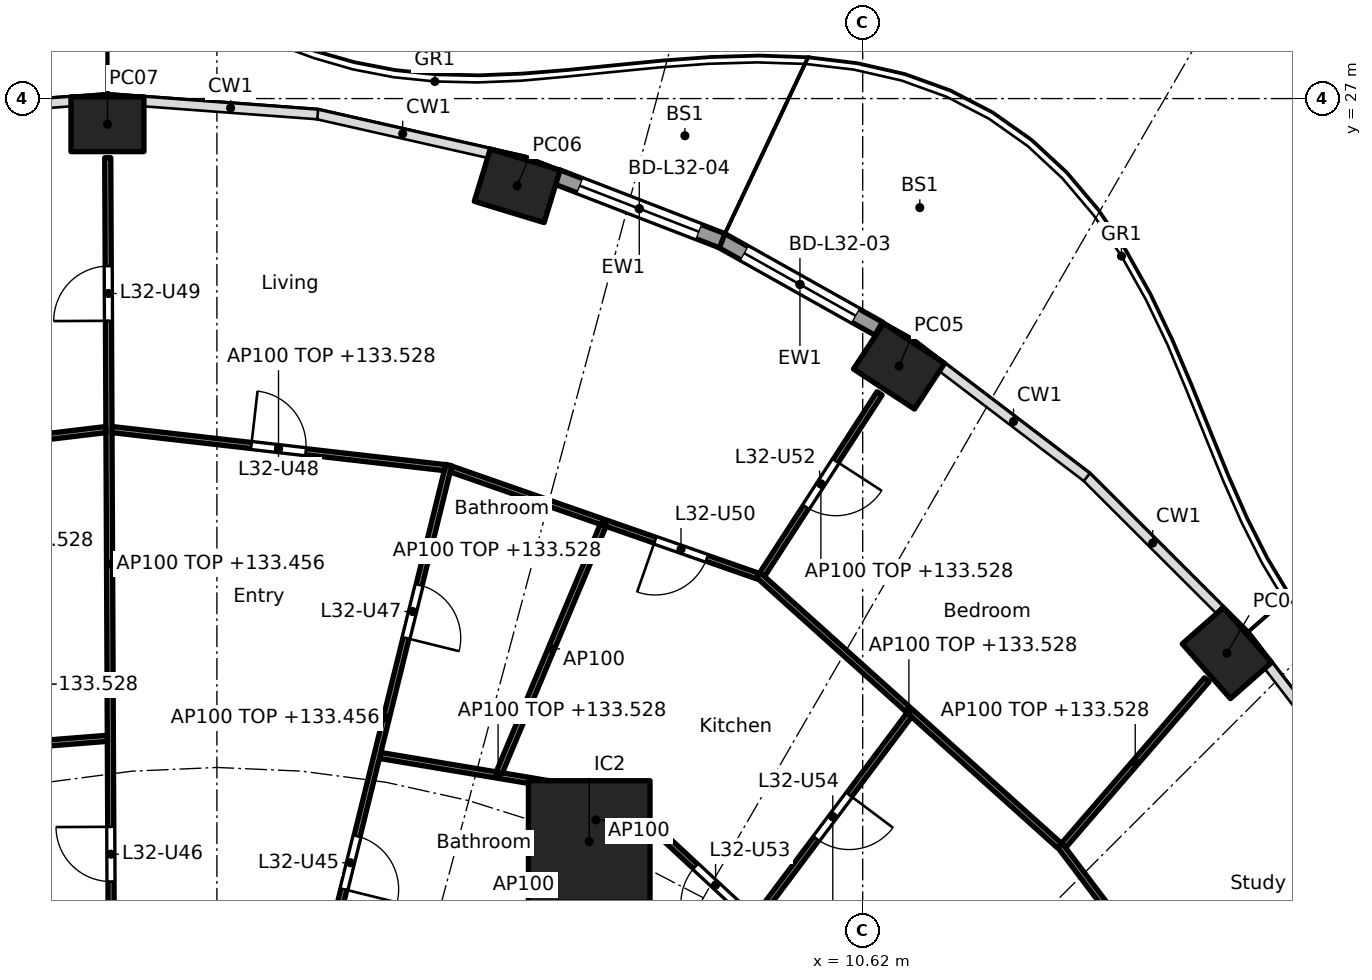
"""IFC4 building model, lengths in metres.
Left out: names, types, materials, properties, quantities, classifications, styles, units other than length and angle.
Written with IfcOpenShell. Run it as: python <this file> out.ifc"""

import sys

from ifc_helpers import new_model, si_unit, direction, frame, frame_2d, origin, origin_2d, place, context, subcontext, project, spatial, rectangle, hollow_rectangle, extrude, element, fill, save


model = new_model("IFC4")
c1 = context("Model", 3, precision=1e-05, world=origin(), true_north=direction((0.0, 1.0)))
c2 = subcontext(c1, "Body", "Model", "MODEL_VIEW")
j1 = project(units=[si_unit("LENGTHUNIT", "METRE"), si_unit("PLANEANGLEUNIT", "RADIAN")], contexts=[c1])
p1 = place(None, origin())
s1 = spatial("IfcSite", under=j1, at=p1, CompositionType="ELEMENT")
p2 = place(p1, origin())
s2 = spatial("IfcBuilding", under=s1, at=p2, CompositionType="ELEMENT")
p3 = place(p2, frame((0.0, 0.0, 130.7)))
s3 = spatial("IfcBuildingStorey", under=s2, at=p3, CompositionType="ELEMENT", Elevation=130.7)
for number, where, z_axis, x_axis in (
    (1, (16.61, 17.88, 0.0), (0.0, 0.0, 1.0), (-0.66, 0.751, 0.0)),
    (2, (11.218, 22.599, 0.0), (0.0, 0.0, 1.0), (-0.836, 0.549, 0.0)),
    (3, (4.938, 25.565, 0.0), (0.0, 0.0, 1.0), (-0.957, 0.292, 0.0)),
    (4, (-1.8, 26.577, 0.0), (0.0, 0.0, 1.0), (-1.0, 0.0, 0.0)),
):
    element("IfcColumn", number, at=place(p3, frame(where, z_axis=z_axis, x_axis=x_axis)), inside=s3, PredefinedType="COLUMN", context=c2, shape_type="SweptSolid", body=[
        extrude(hollow_rectangle(XDim=1.2, YDim=0.9, WallThickness=0.04, at=origin_2d()), origin(), (0.0, 0.0, 1.0), 3.7),
    ])
p4 = place(p3, frame((6.123, 14.782, 0.0), z_axis=(0.0, 0.0, 1.0), x_axis=(1.0, 0.0, 0.0)))
e5 = element("IfcColumn", 5, at=p4, inside=s3, PredefinedType="COLUMN", context=c2, shape_type="SweptSolid", body=[
    extrude(rectangle(XDim=2.0, YDim=2.0, at=origin_2d()), origin(), (0.0, 0.0, 1.0), 3.7),
])
p5 = place(p3, frame((8.293, 24.67, 0.0), z_axis=(0.0, 0.0, 1.0), x_axis=(0.87206688547, -0.489386705241, 0.0)))
e6 = element("IfcWall", 6, at=p5, inside=s3, PredefinedType="SOLIDWALL", context=c2, shape_type="SweptSolid", body=[
    extrude(rectangle(XDim=2.97, YDim=0.25, at=frame_2d((1.485, 0.0))), origin(), (0.0, 0.0, 1.0), 3.44),
])
p6 = place(p5, frame((0.435, 0.0, 0.0)))
e7 = element("IfcOpeningElement", 7, at=p6, cuts=e6, PredefinedType="OPENING", context=c2, shape_type="SweptSolid", body=[
    extrude(rectangle(XDim=2.1, YDim=2.4, at=frame_2d((1.05, 1.2))), frame((0.0, 0.135, 0.0), z_axis=(0.0, -1.0, 0.0), x_axis=(1.0, 0.0, 0.0)), (0.0, 0.0, 1.0), 0.27),
])
p7 = place(p3, frame((5.583, 25.716, 0.0), z_axis=(0.0, 0.0, 1.0), x_axis=(0.932845344347, -0.360277064952, 0.0)))
e8 = element("IfcWall", 8, at=p7, inside=s3, PredefinedType="SOLIDWALL", context=c2, shape_type="SweptSolid", body=[
    extrude(rectangle(XDim=2.923, YDim=0.25, at=frame_2d((1.462, 0.0))), origin(), (0.0, 0.0, 1.0), 3.44),
])
p8 = place(p7, frame((0.412, 0.0, 0.0)))
e9 = element("IfcOpeningElement", 9, at=p8, cuts=e8, PredefinedType="OPENING", context=c2, shape_type="SweptSolid", body=[
    extrude(rectangle(XDim=2.1, YDim=2.4, at=frame_2d((1.05, 1.2))), frame((0.0, 0.135, 0.0), z_axis=(0.0, -1.0, 0.0), x_axis=(1.0, 0.0, 0.0)), (0.0, 0.0, 1.0), 0.27),
])
p9 = place(p3, frame((18.016, 9.218, 0.0), z_axis=(0.0, 0.0, 1.0), x_axis=(-0.602411163107, 0.798185937338, 0.0)))
e10 = element("IfcWall", 10, at=p9, inside=s3, PredefinedType="PARTITIONING", context=c2, shape_type="SweptSolid", body=[
    extrude(rectangle(XDim=6.894, YDim=0.1, at=frame_2d((3.447, 0.0))), origin(), (0.0, 0.0, 1.0), 2.828),
])
p10 = place(p9, frame((2.972, 0.0, 0.0)))
e11 = element("IfcOpeningElement", 11, at=p10, cuts=e10, PredefinedType="OPENING", context=c2, shape_type="SweptSolid", body=[
    extrude(rectangle(XDim=0.9, YDim=2.1, at=frame_2d((0.45, 1.05))), frame((0.0, 0.06, 0.0), z_axis=(0.0, -1.0, 0.0), x_axis=(1.0, 0.0, 0.0)), (0.0, 0.0, 1.0), 0.12),
])
p11 = place(p3, frame((11.029, 11.443, 0.0), z_axis=(0.0, 0.0, 1.0), x_axis=(-0.733121281629, 0.680097924143, 0.0)))
e12 = element("IfcWall", 12, at=p11, inside=s3, PredefinedType="PARTITIONING", context=c2, shape_type="SweptSolid", body=[
    extrude(rectangle(XDim=6.073, YDim=0.1, at=frame_2d((3.037, 0.0))), origin(), (0.0, 0.0, 1.0), 2.828),
])
p12 = place(p11, frame((3.408, 0.0, 0.0)))
e13 = element("IfcOpeningElement", 13, at=p12, cuts=e12, PredefinedType="OPENING", context=c2, shape_type="SweptSolid", body=[
    extrude(rectangle(XDim=0.9, YDim=2.1, at=frame_2d((0.45, 1.05))), frame((0.0, 0.06, 0.0), z_axis=(0.0, -1.0, 0.0), x_axis=(1.0, 0.0, 0.0)), (0.0, 0.0, 1.0), 0.12),
])
p13 = place(p3, frame((13.926, 14.719, 0.0), z_axis=(0.0, 0.0, 1.0), x_axis=(0.653831857253, 0.756639876323, 0.0)))
e14 = element("IfcWall", 14, at=p13, inside=s3, PredefinedType="PARTITIONING", context=c2, shape_type="SweptSolid", body=[
    extrude(rectangle(XDim=3.598, YDim=0.1, at=frame_2d((1.799, 0.0))), origin(), (0.0, 0.0, 1.0), 2.828),
])
p14 = place(p3, frame((13.856, 14.714, 0.0), z_axis=(0.0, 0.0, 1.0), x_axis=(-0.743793479211, 0.668409500444, 0.0)))
e15 = element("IfcWall", 15, at=p14, inside=s3, PredefinedType="PARTITIONING", context=c2, shape_type="SweptSolid", body=[
    extrude(rectangle(XDim=6.659, YDim=0.1, at=frame_2d((3.329, 0.0))), origin(), (0.0, 0.0, 1.0), 2.828),
])
p15 = place(p3, frame((8.87, 13.514, 0.0), z_axis=(0.0, 0.0, 1.0), x_axis=(0.600475102839, 0.79964345234, 0.0)))
e16 = element("IfcWall", 16, at=p15, inside=s3, PredefinedType="PARTITIONING", context=c2, shape_type="SweptSolid", body=[
    extrude(rectangle(XDim=4.192, YDim=0.1, at=frame_2d((2.096, 0.0))), origin(), (0.0, 0.0, 1.0), 3.44),
])
p16 = place(p15, frame((1.646, 0.0, 0.0)))
e17 = element("IfcOpeningElement", 17, at=p16, cuts=e16, PredefinedType="OPENING", context=c2, shape_type="SweptSolid", body=[
    extrude(rectangle(XDim=0.9, YDim=2.1, at=frame_2d((0.45, 1.05))), frame((0.0, 0.06, 0.0), z_axis=(0.0, -1.0, 0.0), x_axis=(1.0, 0.0, 0.0)), (0.0, 0.0, 1.0), 0.12),
])
p17 = place(p3, frame((5.243, 12.657, 0.0), z_axis=(0.0, 0.0, 1.0), x_axis=(0.382719158442, 0.923864733477, 0.0)))
e18 = element("IfcWall", 18, at=p17, inside=s3, PredefinedType="PARTITIONING", context=c2, shape_type="SweptSolid", body=[
    extrude(rectangle(XDim=2.25, YDim=0.1, at=frame_2d((1.125, 0.0))), origin(), (0.0, 0.0, 1.0), 3.44),
])
p18 = place(p3, frame((6.564, 15.547, 0.0), z_axis=(0.0, 0.0, 1.0), x_axis=(-0.986269521186, 0.165143669511, 0.0)))
e19 = element("IfcWall", 19, at=p18, inside=s3, PredefinedType="PARTITIONING", context=c2, shape_type="SweptSolid", body=[
    extrude(rectangle(XDim=3.934, YDim=0.1, at=frame_2d((1.967, 0.0))), origin(), (0.0, 0.0, 1.0), 2.828),
])
p19 = place(p3, frame((8.968, 19.174, 0.0), z_axis=(0.0, 0.0, 1.0), x_axis=(0.543713319379, 0.83927100887, 0.0)))
e20 = element("IfcWall", 20, at=p19, inside=s3, PredefinedType="PARTITIONING", context=c2, shape_type="SweptSolid", body=[
    extrude(rectangle(XDim=3.549, YDim=0.1, at=frame_2d((1.774, 0.0))), origin(), (0.0, 0.0, 1.0), 2.828),
])
p20 = place(p19, frame((1.324, 0.0, 0.0)))
e21 = element("IfcOpeningElement", 21, at=p20, cuts=e20, PredefinedType="OPENING", context=c2, shape_type="SweptSolid", body=[
    extrude(rectangle(XDim=0.9, YDim=2.1, at=frame_2d((0.45, 1.05))), frame((0.0, 0.06, 0.0), z_axis=(0.0, -1.0, 0.0), x_axis=(1.0, 0.0, 0.0)), (0.0, 0.0, 1.0), 0.12),
])
p21 = place(p3, frame((8.894, 19.148, 0.0), z_axis=(0.0, 0.0, 1.0), x_axis=(-0.944182005381, 0.329424256414, 0.0)))
e22 = element("IfcWall", 22, at=p21, inside=s3, PredefinedType="PARTITIONING", context=c2, shape_type="SweptSolid", body=[
    extrude(rectangle(XDim=5.344, YDim=0.1, at=frame_2d((2.672, 0.0))), origin(), (0.0, 0.0, 1.0), 2.828),
])
p22 = place(p21, frame((0.886, 0.0, 0.0)))
e23 = element("IfcOpeningElement", 23, at=p22, cuts=e22, PredefinedType="OPENING", context=c2, shape_type="SweptSolid", body=[
    extrude(rectangle(XDim=0.9, YDim=2.1, at=frame_2d((0.45, 1.05))), frame((0.0, 0.06, 0.0), z_axis=(0.0, -1.0, 0.0), x_axis=(1.0, 0.0, 0.0)), (0.0, 0.0, 1.0), 0.12),
])
p23 = place(p3, frame((4.643, 15.918, 0.0), z_axis=(0.0, 0.0, 1.0), x_axis=(0.387539433367, 0.921853126906, 0.0)))
e24 = element("IfcWall", 24, at=p23, inside=s3, PredefinedType="PARTITIONING", context=c2, shape_type="SweptSolid", body=[
    extrude(rectangle(XDim=4.408, YDim=0.1, at=frame_2d((2.204, 0.0))), origin(), (0.0, 0.0, 1.0), 3.44),
])
p24 = place(p3, frame((1.759, 12.662, 0.0), z_axis=(0.0, 0.0, 1.0), x_axis=(0.239964949221, 0.970781552743, 0.0)))
e25 = element("IfcWall", 25, at=p24, inside=s3, PredefinedType="PARTITIONING", context=c2, shape_type="SweptSolid", body=[
    extrude(rectangle(XDim=8.562, YDim=0.1, at=frame_2d((4.281, 0.0))), origin(), (0.0, 0.0, 1.0), 2.756),
])
p25 = place(p24, frame((1.375, 0.0, 0.0)))
e26 = element("IfcOpeningElement", 26, at=p25, cuts=e25, PredefinedType="OPENING", context=c2, shape_type="SweptSolid", body=[
    extrude(rectangle(XDim=0.9, YDim=2.1, at=frame_2d((0.45, 1.05))), frame((0.0, 0.06, 0.0), z_axis=(0.0, -1.0, 0.0), x_axis=(1.0, 0.0, 0.0)), (0.0, 0.0, 1.0), 0.12),
])
p26 = place(p24, frame((5.631, 0.0, 0.0)))
e27 = element("IfcOpeningElement", 27, at=p26, cuts=e25, PredefinedType="OPENING", context=c2, shape_type="SweptSolid", body=[
    extrude(rectangle(XDim=0.9, YDim=2.1, at=frame_2d((0.45, 1.05))), frame((0.0, 0.06, 0.0), z_axis=(0.0, -1.0, 0.0), x_axis=(1.0, 0.0, 0.0)), (0.0, 0.0, 1.0), 0.12),
])
p27 = place(p3, frame((3.751, 20.93, 0.0), z_axis=(0.0, 0.0, 1.0), x_axis=(-0.993522105273, 0.113639017658, 0.0)))
e28 = element("IfcWall", 28, at=p27, inside=s3, PredefinedType="PARTITIONING", context=c2, shape_type="SweptSolid", body=[
    extrude(rectangle(XDim=5.513, YDim=0.1, at=frame_2d((2.756, 0.0))), origin(), (0.0, 0.0, 1.0), 2.828),
])
p28 = place(p27, frame((2.306, 0.0, 0.0)))
e29 = element("IfcOpeningElement", 29, at=p28, cuts=e28, PredefinedType="OPENING", context=c2, shape_type="SweptSolid", body=[
    extrude(rectangle(XDim=0.9, YDim=2.1, at=frame_2d((0.45, 1.05))), frame((0.0, 0.06, 0.0), z_axis=(0.0, -1.0, 0.0), x_axis=(1.0, 0.0, 0.0)), (0.0, 0.0, 1.0), 0.12),
])
p29 = place(p3, frame((-1.735, 12.665, 0.0), z_axis=(0.0, 0.0, 1.0), x_axis=(-0.004494500855, 0.99998989968, 0.0)))
e30 = element("IfcWall", 30, at=p29, inside=s3, PredefinedType="PARTITIONING", context=c2, shape_type="SweptSolid", body=[
    extrude(rectangle(XDim=13.363, YDim=0.1, at=frame_2d((6.681, 0.0))), origin(), (0.0, 0.0, 1.0), 2.756),
])
p30 = place(p29, frame((1.459, 0.0, 0.0)))
e31 = element("IfcOpeningElement", 31, at=p30, cuts=e30, PredefinedType="OPENING", context=c2, shape_type="SweptSolid", body=[
    extrude(rectangle(XDim=0.9, YDim=2.1, at=frame_2d((0.45, 1.05))), frame((0.0, 0.06, 0.0), z_axis=(0.0, -1.0, 0.0), x_axis=(1.0, 0.0, 0.0)), (0.0, 0.0, 1.0), 0.12),
])
p31 = place(p29, frame((10.68, 0.0, 0.0)))
e32 = element("IfcOpeningElement", 32, at=p31, cuts=e30, PredefinedType="OPENING", context=c2, shape_type="SweptSolid", body=[
    extrude(rectangle(XDim=0.9, YDim=2.1, at=frame_2d((0.45, 1.05))), frame((0.0, 0.06, 0.0), z_axis=(0.0, -1.0, 0.0), x_axis=(1.0, 0.0, 0.0)), (0.0, 0.0, 1.0), 0.12),
])
p32 = place(p3, frame((-1.802, 16.479, 0.0), z_axis=(0.0, 0.0, 1.0), x_axis=(-0.996907698294, -0.078581429625, 0.0)))
e33 = element("IfcWall", 33, at=p32, inside=s3, PredefinedType="PARTITIONING", context=c2, shape_type="SweptSolid", body=[
    extrude(rectangle(XDim=4.536, YDim=0.1, at=frame_2d((2.268, 0.0))), origin(), (0.0, 0.0, 1.0), 2.828),
])
p33 = place(p3, frame((-1.825, 21.557, 0.0), z_axis=(0.0, 0.0, 1.0), x_axis=(-0.992915053711, -0.11882632753, 0.0)))
e34 = element("IfcWall", 34, at=p33, inside=s3, PredefinedType="PARTITIONING", context=c2, shape_type="SweptSolid", body=[
    extrude(rectangle(XDim=5.615, YDim=0.1, at=frame_2d((2.808, 0.0))), origin(), (0.0, 0.0, 1.0), 2.828),
])
p34 = place(p33, frame((2.358, 0.0, 0.0)))
e35 = element("IfcOpeningElement", 35, at=p34, cuts=e34, PredefinedType="OPENING", context=c2, shape_type="SweptSolid", body=[
    extrude(rectangle(XDim=0.9, YDim=2.1, at=frame_2d((0.45, 1.05))), frame((0.0, 0.06, 0.0), z_axis=(0.0, -1.0, 0.0), x_axis=(1.0, 0.0, 0.0)), (0.0, 0.0, 1.0), 0.12),
])
p35 = place(p3, frame((6.417, 15.42, 0.0), z_axis=(0.0, 0.0, 1.0), x_axis=(-0.543777264953, -0.839229578911, 0.0)))
e36 = element("IfcWall", 36, at=p35, inside=s3, PredefinedType="PARTITIONING", context=c2, shape_type="SweptSolid", body=[
    extrude(rectangle(XDim=0.673, YDim=0.1, at=frame_2d((0.337, 0.0))), origin(), (0.0, 0.0, 1.0), 3.44),
])
p36 = place(p6, origin())
e37 = element("IfcDoor", 37, at=p36, inside=s3, OperationType="SLIDING_TO_LEFT", PredefinedType="DOOR", context=c2, shape_type="SweptSolid", body=[
    extrude(rectangle(XDim=2.1, YDim=2.4, at=frame_2d((1.05, 1.2))), frame((0.0, 0.025, 0.0), z_axis=(0.0, -1.0, 0.0), x_axis=(1.0, 0.0, 0.0)), (0.0, 0.0, 1.0), 0.05),
])
fill(e7, e37)
p37 = place(p8, origin())
e38 = element("IfcDoor", 38, at=p37, inside=s3, OperationType="SLIDING_TO_LEFT", PredefinedType="DOOR", context=c2, shape_type="SweptSolid", body=[
    extrude(rectangle(XDim=2.1, YDim=2.4, at=frame_2d((1.05, 1.2))), frame((0.0, 0.025, 0.0), z_axis=(0.0, -1.0, 0.0), x_axis=(1.0, 0.0, 0.0)), (0.0, 0.0, 1.0), 0.05),
])
fill(e9, e38)
p38 = place(p25, frame((0.9, 0.0, 0.0), x_axis=(-1.0, 0.0, 0.0)))
e39 = element("IfcDoor", 39, at=p38, inside=s3, OperationType="SINGLE_SWING_RIGHT", PredefinedType="DOOR", context=c2, shape_type="SweptSolid", body=[
    extrude(rectangle(XDim=0.9, YDim=2.1, at=frame_2d((0.45, 1.05))), frame((0.0, 0.025, 0.0), z_axis=(0.0, -1.0, 0.0), x_axis=(1.0, 0.0, 0.0)), (0.0, 0.0, 1.0), 0.05),
])
fill(e26, e39)
p39 = place(p30, origin())
e40 = element("IfcDoor", 40, at=p39, inside=s3, OperationType="SINGLE_SWING_RIGHT", PredefinedType="DOOR", context=c2, shape_type="SweptSolid", body=[
    extrude(rectangle(XDim=0.9, YDim=2.1, at=frame_2d((0.45, 1.05))), frame((0.0, 0.025, 0.0), z_axis=(0.0, -1.0, 0.0), x_axis=(1.0, 0.0, 0.0)), (0.0, 0.0, 1.0), 0.05),
])
fill(e31, e40)
p40 = place(p26, frame((0.9, 0.0, 0.0), x_axis=(-1.0, 0.0, 0.0)))
e41 = element("IfcDoor", 41, at=p40, inside=s3, OperationType="SINGLE_SWING_RIGHT", PredefinedType="DOOR", context=c2, shape_type="SweptSolid", body=[
    extrude(rectangle(XDim=0.9, YDim=2.1, at=frame_2d((0.45, 1.05))), frame((0.0, 0.025, 0.0), z_axis=(0.0, -1.0, 0.0), x_axis=(1.0, 0.0, 0.0)), (0.0, 0.0, 1.0), 0.05),
])
fill(e27, e41)
p41 = place(p28, frame((0.9, 0.0, 0.0), x_axis=(-1.0, 0.0, 0.0)))
e42 = element("IfcDoor", 42, at=p41, inside=s3, OperationType="SINGLE_SWING_LEFT", PredefinedType="DOOR", context=c2, shape_type="SweptSolid", body=[
    extrude(rectangle(XDim=0.9, YDim=2.1, at=frame_2d((0.45, 1.05))), frame((0.0, 0.025, 0.0), z_axis=(0.0, -1.0, 0.0), x_axis=(1.0, 0.0, 0.0)), (0.0, 0.0, 1.0), 0.05),
])
fill(e29, e42)
p42 = place(p31, origin())
e43 = element("IfcDoor", 43, at=p42, inside=s3, OperationType="SINGLE_SWING_LEFT", PredefinedType="DOOR", context=c2, shape_type="SweptSolid", body=[
    extrude(rectangle(XDim=0.9, YDim=2.1, at=frame_2d((0.45, 1.05))), frame((0.0, 0.025, 0.0), z_axis=(0.0, -1.0, 0.0), x_axis=(1.0, 0.0, 0.0)), (0.0, 0.0, 1.0), 0.05),
])
fill(e32, e43)
p43 = place(p22, origin())
e44 = element("IfcDoor", 44, at=p43, inside=s3, OperationType="SINGLE_SWING_RIGHT", PredefinedType="DOOR", context=c2, shape_type="SweptSolid", body=[
    extrude(rectangle(XDim=0.9, YDim=2.1, at=frame_2d((0.45, 1.05))), frame((0.0, 0.025, 0.0), z_axis=(0.0, -1.0, 0.0), x_axis=(1.0, 0.0, 0.0)), (0.0, 0.0, 1.0), 0.05),
])
fill(e23, e44)
p44 = place(p20, frame((0.9, 0.0, 0.0), x_axis=(-1.0, 0.0, 0.0)))
e45 = element("IfcDoor", 45, at=p44, inside=s3, OperationType="SINGLE_SWING_LEFT", PredefinedType="DOOR", context=c2, shape_type="SweptSolid", body=[
    extrude(rectangle(XDim=0.9, YDim=2.1, at=frame_2d((0.45, 1.05))), frame((0.0, 0.025, 0.0), z_axis=(0.0, -1.0, 0.0), x_axis=(1.0, 0.0, 0.0)), (0.0, 0.0, 1.0), 0.05),
])
fill(e21, e45)
p45 = place(p12, origin())
e46 = element("IfcDoor", 46, at=p45, inside=s3, OperationType="SINGLE_SWING_LEFT", PredefinedType="DOOR", context=c2, shape_type="SweptSolid", body=[
    extrude(rectangle(XDim=0.9, YDim=2.1, at=frame_2d((0.45, 1.05))), frame((0.0, 0.025, 0.0), z_axis=(0.0, -1.0, 0.0), x_axis=(1.0, 0.0, 0.0)), (0.0, 0.0, 1.0), 0.05),
])
fill(e13, e46)
p46 = place(p16, frame((0.9, 0.0, 0.0), x_axis=(-1.0, 0.0, 0.0)))
e47 = element("IfcDoor", 47, at=p46, inside=s3, OperationType="SINGLE_SWING_LEFT", PredefinedType="DOOR", context=c2, shape_type="SweptSolid", body=[
    extrude(rectangle(XDim=0.9, YDim=2.1, at=frame_2d((0.45, 1.05))), frame((0.0, 0.025, 0.0), z_axis=(0.0, -1.0, 0.0), x_axis=(1.0, 0.0, 0.0)), (0.0, 0.0, 1.0), 0.05),
])
fill(e17, e47)
save(model, sys.argv[1])
